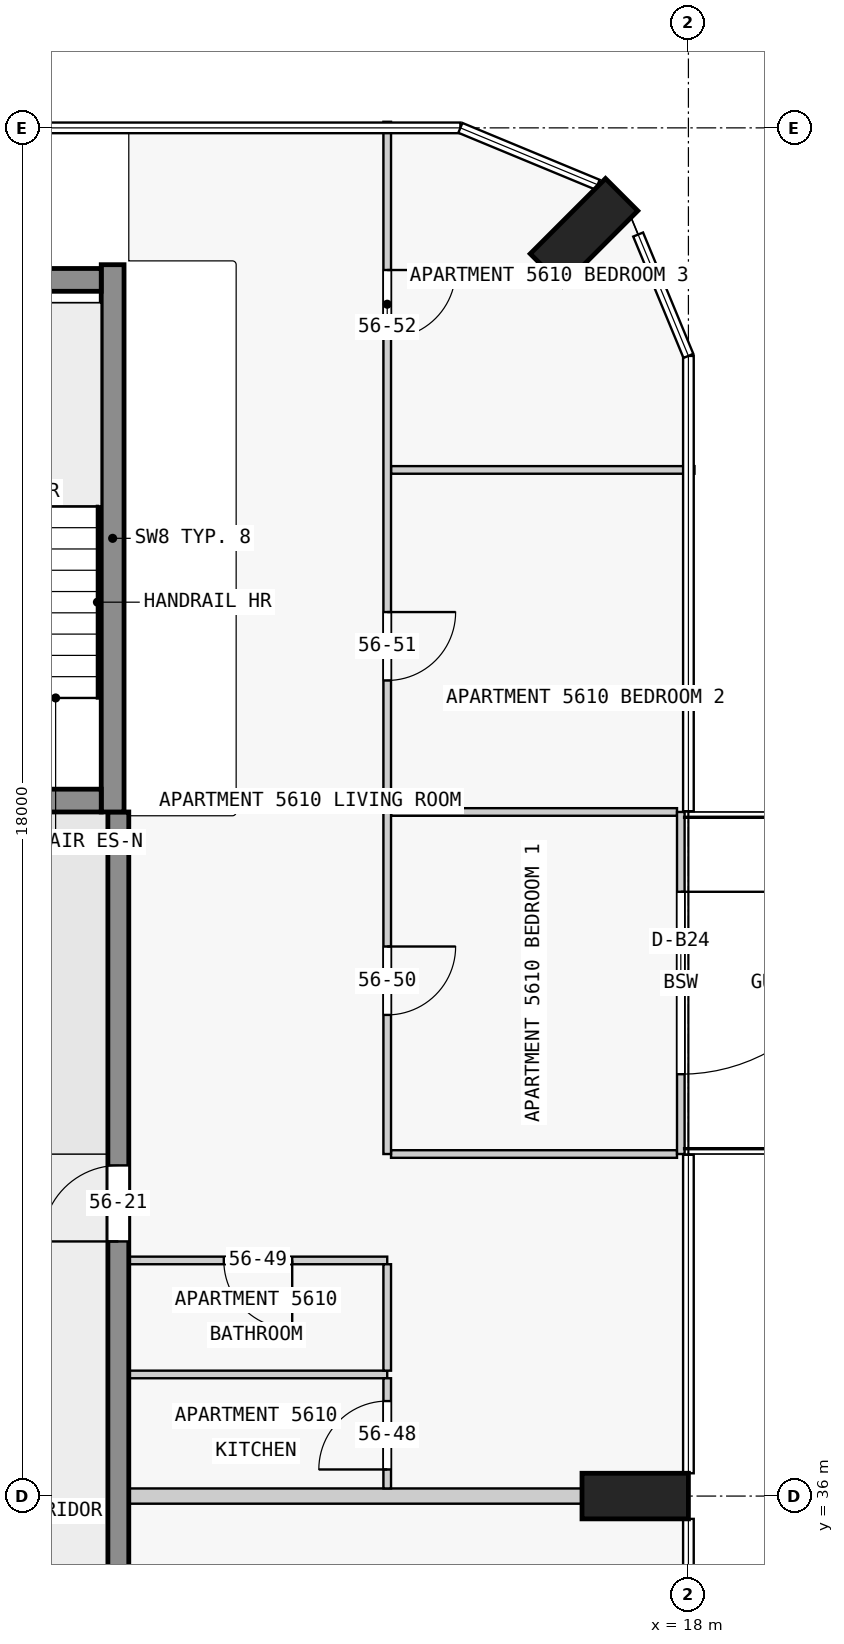
"""IFC4 building model, lengths in metres.
Left out: names, types, materials, properties, quantities, classifications, styles, units other than length and angle.
Written with IfcOpenShell. Run it as: python <this file> out.ifc"""

import sys

from ifc_helpers import new_model, si_unit, direction, frame, frame_2d, origin, origin_2d, place, context, subcontext, project, spatial, rectangle, extrude, element, fill, save


model = new_model("IFC4")
c1 = context("Model", 3, precision=1e-05, world=origin(), true_north=direction((0.0, 1.0)))
c2 = subcontext(c1, "Body", "Model", "MODEL_VIEW")
j1 = project(units=[si_unit("LENGTHUNIT", "METRE"), si_unit("PLANEANGLEUNIT", "RADIAN")], contexts=[c1])
p1 = place(None, origin())
s1 = spatial("IfcSite", under=j1, at=p1, CompositionType="ELEMENT")
p2 = place(p1, origin())
s2 = spatial("IfcBuilding", under=s1, at=p2, CompositionType="ELEMENT")
p3 = place(p2, frame((0.0, 0.0, 215.4)))
s3 = spatial("IfcBuildingStorey", under=s2, at=p3, CompositionType="ELEMENT", Elevation=215.4)
for number, where, z_axis, x_axis in (
    (1, (17.3, 36.0, 0.0), (0.0, 0.0, 1.0), (0.0, 1.0, 0.0)),
    (2, (16.626, 52.626, 0.0), (0.0, 0.0, 1.0), (-0.707, 0.707, 0.0)),
):
    element("IfcColumn", number, at=place(p3, frame(where, z_axis=z_axis, x_axis=x_axis)), inside=s3, PredefinedType="COLUMN", context=c2, shape_type="SweptSolid", body=[
        extrude(rectangle(XDim=0.6, YDim=1.4, at=origin_2d()), origin(), (0.0, 0.0, 1.0), 3.5),
    ])
p4 = place(p3, frame((7.725, 45.15, 0.0), z_axis=(0.0, 0.0, 1.0), x_axis=(1.0, 0.0, 0.0)))
e3 = element("IfcWall", 3, at=p4, inside=s3, PredefinedType="SHEAR", context=c2, shape_type="SweptSolid", body=[
    extrude(rectangle(XDim=2.55, YDim=0.3, at=frame_2d((1.275, 0.0))), origin(), (0.0, 0.0, 1.0), 3.5),
])
p5 = place(p4, frame((0.725, 0.0, 0.0)))
e4 = element("IfcOpeningElement", 4, at=p5, cuts=e3, PredefinedType="OPENING", context=c2, shape_type="SweptSolid", body=[
    extrude(rectangle(XDim=1.1, YDim=2.1, at=frame_2d((0.55, 1.05))), frame((0.0, 0.16, 0.0), z_axis=(0.0, -1.0, 0.0), x_axis=(1.0, 0.0, 0.0)), (0.0, 0.0, 1.0), 0.32),
])
p6 = place(p3, frame((7.725, 52.0, 0.0), z_axis=(0.0, 0.0, 1.0), x_axis=(1.0, 0.0, 0.0)))
e5 = element("IfcWall", 5, at=p6, inside=s3, PredefinedType="SHEAR", context=c2, shape_type="SweptSolid", body=[
    extrude(rectangle(XDim=2.55, YDim=0.3, at=frame_2d((1.275, 0.0))), origin(), (0.0, 0.0, 1.0), 3.5),
])
p7 = place(p3, frame((10.425, 45.0, 0.0), z_axis=(0.0, 0.0, 1.0), x_axis=(0.0, 1.0, 0.0)))
e6 = element("IfcWall", 6, at=p7, inside=s3, PredefinedType="SHEAR", context=c2, shape_type="SweptSolid", body=[
    extrude(rectangle(XDim=7.2, YDim=0.3, at=frame_2d((3.6, 0.0))), origin(), (0.0, 0.0, 1.0), 3.5),
])
p8 = place(p3, frame((10.5, 18.0, 0.0), z_axis=(0.0, 0.0, 1.0), x_axis=(0.0, 1.0, 0.0)))
e7 = element("IfcWall", 7, at=p8, inside=s3, PredefinedType="SHEAR", context=c2, shape_type="SweptSolid", body=[
    extrude(rectangle(XDim=27.0, YDim=0.275, at=frame_2d((13.5, 0.0))), origin(), (0.0, 0.0, 1.0), 3.25),
])
p9 = place(p8, frame((1.75, 0.0, 0.0)))
e8 = element("IfcOpeningElement", 8, at=p9, cuts=e7, PredefinedType="OPENING", context=c2, shape_type="SweptSolid", body=[
    extrude(rectangle(XDim=1.0, YDim=2.1, at=frame_2d((0.5, 1.05))), frame((0.0, 0.147, 0.0), z_axis=(0.0, -1.0, 0.0), x_axis=(1.0, 0.0, 0.0)), (0.0, 0.0, 1.0), 0.295),
])
p10 = place(p8, frame((6.25, 0.0, 0.0)))
e9 = element("IfcOpeningElement", 9, at=p10, cuts=e7, PredefinedType="OPENING", context=c2, shape_type="SweptSolid", body=[
    extrude(rectangle(XDim=1.0, YDim=2.1, at=frame_2d((0.5, 1.05))), frame((0.0, 0.147, 0.0), z_axis=(0.0, -1.0, 0.0), x_axis=(1.0, 0.0, 0.0)), (0.0, 0.0, 1.0), 0.295),
])
p11 = place(p8, frame((10.75, 0.0, 0.0)))
e10 = element("IfcOpeningElement", 10, at=p11, cuts=e7, PredefinedType="OPENING", context=c2, shape_type="SweptSolid", body=[
    extrude(rectangle(XDim=1.0, YDim=2.1, at=frame_2d((0.5, 1.05))), frame((0.0, 0.147, 0.0), z_axis=(0.0, -1.0, 0.0), x_axis=(1.0, 0.0, 0.0)), (0.0, 0.0, 1.0), 0.295),
])
p12 = place(p8, frame((15.25, 0.0, 0.0)))
e11 = element("IfcOpeningElement", 11, at=p12, cuts=e7, PredefinedType="OPENING", context=c2, shape_type="SweptSolid", body=[
    extrude(rectangle(XDim=1.0, YDim=2.1, at=frame_2d((0.5, 1.05))), frame((0.0, 0.147, 0.0), z_axis=(0.0, -1.0, 0.0), x_axis=(1.0, 0.0, 0.0)), (0.0, 0.0, 1.0), 0.295),
])
p13 = place(p8, frame((21.35, 0.0, 0.0)))
e12 = element("IfcOpeningElement", 12, at=p13, cuts=e7, PredefinedType="OPENING", context=c2, shape_type="SweptSolid", body=[
    extrude(rectangle(XDim=1.0, YDim=2.1, at=frame_2d((0.5, 1.05))), frame((0.0, 0.147, 0.0), z_axis=(0.0, -1.0, 0.0), x_axis=(1.0, 0.0, 0.0)), (0.0, 0.0, 1.0), 0.295),
])
p14 = place(p3, frame((17.9, 45.0, 0.0), z_axis=(0.0, 0.0, 1.0), x_axis=(0.0, -1.0, 0.0)))
e13 = element("IfcWall", 13, at=p14, inside=s3, PredefinedType="STANDARD", context=c2, shape_type="SweptSolid", body=[
    extrude(rectangle(XDim=4.5, YDim=0.1, at=frame_2d((2.25, 0.0))), origin(), (0.0, 0.0, 1.0), 3.25),
])
p15 = place(p14, frame((1.05, 0.0, 0.0)))
e14 = element("IfcOpeningElement", 14, at=p15, cuts=e13, PredefinedType="OPENING", context=c2, shape_type="SweptSolid", body=[
    extrude(rectangle(XDim=2.4, YDim=2.4, at=frame_2d((1.2, 1.2))), frame((0.0, 0.06, 0.0), z_axis=(0.0, -1.0, 0.0), x_axis=(1.0, 0.0, 0.0)), (0.0, 0.0, 1.0), 0.12),
])
p16 = place(p3, frame((16.6, 36.0, 0.0), z_axis=(0.0, 0.0, 1.0), x_axis=(-1.0, 0.0, 0.0)))
e15 = element("IfcWall", 15, at=p16, inside=s3, PredefinedType="PARTITIONING", context=c2, shape_type="SweptSolid", body=[
    extrude(rectangle(XDim=5.963, YDim=0.2, at=frame_2d((2.981, 0.0))), origin(), (0.0, 0.0, 1.0), 3.25),
])
p17 = place(p3, frame((14.038, 37.6, 0.0), z_axis=(0.0, 0.0, 1.0), x_axis=(-1.0, 0.0, 0.0)))
e16 = element("IfcWall", 16, at=p17, inside=s3, PredefinedType="PARTITIONING", context=c2, shape_type="SweptSolid", body=[
    extrude(rectangle(XDim=3.4, YDim=0.1, at=frame_2d((1.7, 0.0))), origin(), (0.0, 0.0, 1.0), 3.25),
])
p18 = place(p3, frame((14.038, 39.1, 0.0), z_axis=(0.0, 0.0, 1.0), x_axis=(-1.0, 0.0, 0.0)))
e17 = element("IfcWall", 17, at=p18, inside=s3, PredefinedType="PARTITIONING", context=c2, shape_type="SweptSolid", body=[
    extrude(rectangle(XDim=3.4, YDim=0.1, at=frame_2d((1.7, 0.0))), origin(), (0.0, 0.0, 1.0), 3.25),
])
p19 = place(p18, frame((1.25, 0.0, 0.0)))
e18 = element("IfcOpeningElement", 18, at=p19, cuts=e17, PredefinedType="OPENING", context=c2, shape_type="SweptSolid", body=[
    extrude(rectangle(XDim=0.9, YDim=2.1, at=frame_2d((0.45, 1.05))), frame((0.0, 0.06, 0.0), z_axis=(0.0, -1.0, 0.0), x_axis=(1.0, 0.0, 0.0)), (0.0, 0.0, 1.0), 0.12),
])
for number, where, z_axis, x_axis in (
    (19, (14.087, 40.5, 0.0), (0.0, 0.0, 1.0), (1.0, 0.0, 0.0)),
    (20, (17.85, 45.0, 0.0), (0.0, 0.0, 1.0), (-1.0, 0.0, 0.0)),
):
    element("IfcWall", number, at=place(p3, frame(where, z_axis=z_axis, x_axis=x_axis)), inside=s3, PredefinedType="PARTITIONING", context=c2, shape_type="SweptSolid", body=[
        extrude(rectangle(XDim=3.763, YDim=0.1, at=frame_2d((1.881, 0.0))), origin(), (0.0, 0.0, 1.0), 3.25),
    ])
p20 = place(p3, frame((18.08, 49.5, 0.0), z_axis=(0.0, 0.0, 1.0), x_axis=(-1.0, 0.0, 0.0)))
e21 = element("IfcWall", 21, at=p20, inside=s3, PredefinedType="PARTITIONING", context=c2, shape_type="SweptSolid", body=[
    extrude(rectangle(XDim=3.993, YDim=0.1, at=frame_2d((1.996, 0.0))), origin(), (0.0, 0.0, 1.0), 3.25),
])
p21 = place(p3, frame((14.038, 54.08, 0.0), z_axis=(0.0, 0.0, 1.0), x_axis=(0.0, -1.0, 0.0)))
e22 = element("IfcWall", 22, at=p21, inside=s3, PredefinedType="PARTITIONING", context=c2, shape_type="SweptSolid", body=[
    extrude(rectangle(XDim=13.58, YDim=0.1, at=frame_2d((6.79, 0.0))), origin(), (0.0, 0.0, 1.0), 3.25),
])
p22 = place(p21, frame((10.85, 0.0, 0.0)))
e23 = element("IfcOpeningElement", 23, at=p22, cuts=e22, PredefinedType="OPENING", context=c2, shape_type="SweptSolid", body=[
    extrude(rectangle(XDim=0.9, YDim=2.1, at=frame_2d((0.45, 1.05))), frame((0.0, 0.06, 0.0), z_axis=(0.0, -1.0, 0.0), x_axis=(1.0, 0.0, 0.0)), (0.0, 0.0, 1.0), 0.12),
])
p23 = place(p21, frame((6.45, 0.0, 0.0)))
e24 = element("IfcOpeningElement", 24, at=p23, cuts=e22, PredefinedType="OPENING", context=c2, shape_type="SweptSolid", body=[
    extrude(rectangle(XDim=0.9, YDim=2.1, at=frame_2d((0.45, 1.05))), frame((0.0, 0.06, 0.0), z_axis=(0.0, -1.0, 0.0), x_axis=(1.0, 0.0, 0.0)), (0.0, 0.0, 1.0), 0.12),
])
p24 = place(p21, frame((1.95, 0.0, 0.0)))
e25 = element("IfcOpeningElement", 25, at=p24, cuts=e22, PredefinedType="OPENING", context=c2, shape_type="SweptSolid", body=[
    extrude(rectangle(XDim=0.9, YDim=2.1, at=frame_2d((0.45, 1.05))), frame((0.0, 0.06, 0.0), z_axis=(0.0, -1.0, 0.0), x_axis=(1.0, 0.0, 0.0)), (0.0, 0.0, 1.0), 0.12),
])
p25 = place(p3, frame((14.038, 36.1, 0.0), z_axis=(0.0, 0.0, 1.0), x_axis=(0.0, 1.0, 0.0)))
e26 = element("IfcWall", 26, at=p25, inside=s3, PredefinedType="PARTITIONING", context=c2, shape_type="SweptSolid", body=[
    extrude(rectangle(XDim=1.45, YDim=0.1, at=frame_2d((0.725, 0.0))), origin(), (0.0, 0.0, 1.0), 3.25),
])
p26 = place(p25, frame((0.25, 0.0, 0.0)))
e27 = element("IfcOpeningElement", 27, at=p26, cuts=e26, PredefinedType="OPENING", context=c2, shape_type="SweptSolid", body=[
    extrude(rectangle(XDim=0.9, YDim=2.1, at=frame_2d((0.45, 1.05))), frame((0.0, 0.06, 0.0), z_axis=(0.0, -1.0, 0.0), x_axis=(1.0, 0.0, 0.0)), (0.0, 0.0, 1.0), 0.12),
])
p27 = place(p3, frame((14.038, 37.65, 0.0), z_axis=(0.0, 0.0, 1.0), x_axis=(0.0, 1.0, 0.0)))
e28 = element("IfcWall", 28, at=p27, inside=s3, PredefinedType="PARTITIONING", context=c2, shape_type="SweptSolid", body=[
    extrude(rectangle(XDim=1.4, YDim=0.1, at=frame_2d((0.7, 0.0))), origin(), (0.0, 0.0, 1.0), 3.25),
])
p28 = place(p15, origin())
e29 = element("IfcDoor", 29, at=p28, inside=s3, OperationType="SINGLE_SWING_LEFT", PredefinedType="DOOR", context=c2, shape_type="SweptSolid", body=[
    extrude(rectangle(XDim=2.4, YDim=2.4, at=frame_2d((1.2, 1.2))), frame((0.0, 0.025, 0.0), z_axis=(0.0, -1.0, 0.0), x_axis=(1.0, 0.0, 0.0)), (0.0, 0.0, 1.0), 0.05),
])
fill(e14, e29)
p29 = place(p13, origin())
e30 = element("IfcDoor", 30, at=p29, inside=s3, OperationType="SINGLE_SWING_RIGHT", PredefinedType="DOOR", context=c2, shape_type="SweptSolid", body=[
    extrude(rectangle(XDim=1.0, YDim=2.1, at=frame_2d((0.5, 1.05))), frame((0.0, 0.025, 0.0), z_axis=(0.0, -1.0, 0.0), x_axis=(1.0, 0.0, 0.0)), (0.0, 0.0, 1.0), 0.05),
])
fill(e12, e30)
p30 = place(p26, origin())
e31 = element("IfcDoor", 31, at=p30, inside=s3, OperationType="SINGLE_SWING_LEFT", PredefinedType="DOOR", context=c2, shape_type="SweptSolid", body=[
    extrude(rectangle(XDim=0.9, YDim=2.1, at=frame_2d((0.45, 1.05))), frame((0.0, 0.025, 0.0), z_axis=(0.0, -1.0, 0.0), x_axis=(1.0, 0.0, 0.0)), (0.0, 0.0, 1.0), 0.05),
])
fill(e27, e31)
p31 = place(p19, origin())
e32 = element("IfcDoor", 32, at=p31, inside=s3, OperationType="SINGLE_SWING_LEFT", PredefinedType="DOOR", context=c2, shape_type="SweptSolid", body=[
    extrude(rectangle(XDim=0.9, YDim=2.1, at=frame_2d((0.45, 1.05))), frame((0.0, 0.025, 0.0), z_axis=(0.0, -1.0, 0.0), x_axis=(1.0, 0.0, 0.0)), (0.0, 0.0, 1.0), 0.05),
])
fill(e18, e32)
p32 = place(p22, origin())
e33 = element("IfcDoor", 33, at=p32, inside=s3, OperationType="SINGLE_SWING_RIGHT", PredefinedType="DOOR", context=c2, shape_type="SweptSolid", body=[
    extrude(rectangle(XDim=0.9, YDim=2.1, at=frame_2d((0.45, 1.05))), frame((0.0, 0.025, 0.0), z_axis=(0.0, -1.0, 0.0), x_axis=(1.0, 0.0, 0.0)), (0.0, 0.0, 1.0), 0.05),
])
fill(e23, e33)
p33 = place(p23, origin())
e34 = element("IfcDoor", 34, at=p33, inside=s3, OperationType="SINGLE_SWING_RIGHT", PredefinedType="DOOR", context=c2, shape_type="SweptSolid", body=[
    extrude(rectangle(XDim=0.9, YDim=2.1, at=frame_2d((0.45, 1.05))), frame((0.0, 0.025, 0.0), z_axis=(0.0, -1.0, 0.0), x_axis=(1.0, 0.0, 0.0)), (0.0, 0.0, 1.0), 0.05),
])
fill(e24, e34)
p34 = place(p24, origin())
e35 = element("IfcDoor", 35, at=p34, inside=s3, OperationType="SINGLE_SWING_LEFT", PredefinedType="DOOR", context=c2, shape_type="SweptSolid", body=[
    extrude(rectangle(XDim=0.9, YDim=2.1, at=frame_2d((0.45, 1.05))), frame((0.0, 0.025, 0.0), z_axis=(0.0, -1.0, 0.0), x_axis=(1.0, 0.0, 0.0)), (0.0, 0.0, 1.0), 0.05),
])
fill(e25, e35)
save(model, sys.argv[1])
